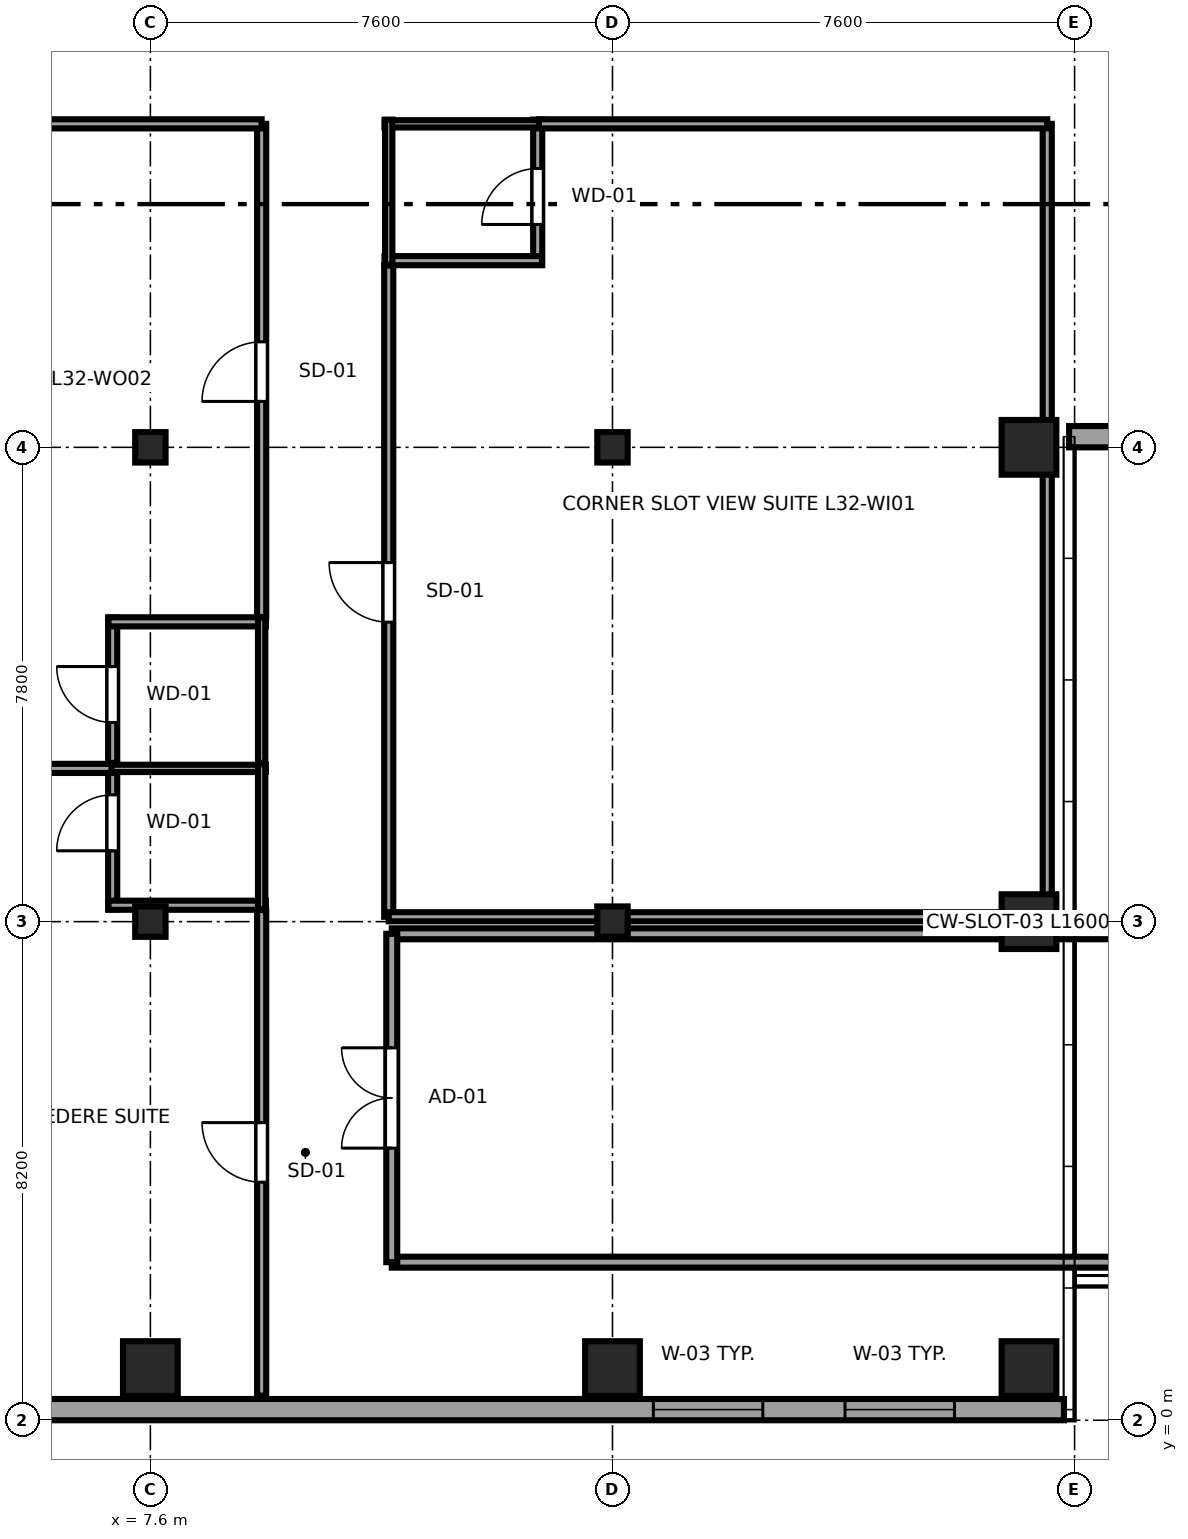
"""IFC4 building model, lengths in metres.
Left out: names, types, materials, properties, quantities, classifications, styles, units other than length and angle.
Written with IfcOpenShell. Run it as: python <this file> out.ifc"""

import sys

from ifc_helpers import new_model, si_unit, direction, frame, frame_2d, origin, origin_2d, place, context, subcontext, project, spatial, rectangle, i_section, extrude, source, transform, mapped, element, fill, save


model = new_model("IFC4")
c1 = context("Model", 3, precision=1e-05, world=origin(), true_north=direction((0.0, 1.0)))
c2 = subcontext(c1, "Body", "Model", "MODEL_VIEW")
j1 = project(units=[si_unit("LENGTHUNIT", "METRE"), si_unit("PLANEANGLEUNIT", "RADIAN")], contexts=[c1])
p1 = place(None, origin())
s1 = spatial("IfcSite", under=j1, at=p1, CompositionType="ELEMENT")
p2 = place(p1, origin())
s2 = spatial("IfcBuilding", under=s1, at=p2, CompositionType="ELEMENT")
p3 = place(p2, frame((0.0, 0.0, 125.75)))
s3 = spatial("IfcBuildingStorey", under=s2, at=p3, CompositionType="ELEMENT", Elevation=125.75)
m1 = source(origin(), c2, "Body", "SweptSolid", [
    extrude(rectangle(XDim=0.9, YDim=0.9, at=origin_2d()), origin(), (0.0, 0.0, 1.0), 3.55),
])
p4 = place(p3, frame((7.6, 0.85, 0.0), z_axis=(0.0, 0.0, 1.0), x_axis=(1.0, 0.0, 0.0)))
e1 = element("IfcColumn", 1, at=p4, inside=s3, PredefinedType="COLUMN", context=c2, shape_type="MappedRepresentation", body=[
    mapped(m1, transform((0.0, 0.0, 0.0), x_axis=(1.0, 0.0, 0.0), y_axis=(0.0, 1.0, 0.0), z_axis=(0.0, 0.0, 1.0), scale=1.0)),
])
m2 = source(origin(), c2, "Body", "SweptSolid", [
    extrude(i_section(OverallWidth=0.5, OverallDepth=0.5, WebThickness=0.022, FlangeThickness=0.034, at=origin_2d()), origin(), (0.0, 0.0, 1.0), 3.55),
])
for number, where, z_axis, x_axis in (
    (2, (7.6, 8.2, 0.0), (0.0, 0.0, 1.0), (1.0, 0.0, 0.0)),
    (3, (7.6, 16.0, 0.0), (0.0, 0.0, 1.0), (1.0, 0.0, 0.0)),
):
    element("IfcColumn", number, at=place(p3, frame(where, z_axis=z_axis, x_axis=x_axis)), inside=s3, PredefinedType="COLUMN", context=c2, shape_type="MappedRepresentation", body=[
        mapped(m2, transform((0.0, 0.0, 0.0), x_axis=(1.0, 0.0, 0.0), y_axis=(0.0, 1.0, 0.0), z_axis=(0.0, 0.0, 1.0), scale=1.0)),
    ])
p5 = place(p3, frame((15.2, 0.85, 0.0), z_axis=(0.0, 0.0, 1.0), x_axis=(1.0, 0.0, 0.0)))
e4 = element("IfcColumn", 4, at=p5, inside=s3, PredefinedType="COLUMN", context=c2, shape_type="MappedRepresentation", body=[
    mapped(m1, transform((0.0, 0.0, 0.0), x_axis=(1.0, 0.0, 0.0), y_axis=(0.0, 1.0, 0.0), z_axis=(0.0, 0.0, 1.0), scale=1.0)),
])
for number, where, z_axis, x_axis in (
    (5, (15.2, 8.2, 0.0), (0.0, 0.0, 1.0), (1.0, 0.0, 0.0)),
    (6, (15.2, 16.0, 0.0), (0.0, 0.0, 1.0), (1.0, 0.0, 0.0)),
):
    element("IfcColumn", number, at=place(p3, frame(where, z_axis=z_axis, x_axis=x_axis)), inside=s3, PredefinedType="COLUMN", context=c2, shape_type="MappedRepresentation", body=[
        mapped(m2, transform((0.0, 0.0, 0.0), x_axis=(1.0, 0.0, 0.0), y_axis=(0.0, 1.0, 0.0), z_axis=(0.0, 0.0, 1.0), scale=1.0)),
    ])
for number, where, z_axis, x_axis in (
    (7, (22.05, 0.85, 0.0), (0.0, 0.0, 1.0), (1.0, 0.0, 0.0)),
    (8, (22.05, 8.2, 0.0), (0.0, 0.0, 1.0), (1.0, 0.0, 0.0)),
    (9, (22.05, 16.0, 0.0), (0.0, 0.0, 1.0), (1.0, 0.0, 0.0)),
):
    element("IfcColumn", number, at=place(p3, frame(where, z_axis=z_axis, x_axis=x_axis)), inside=s3, PredefinedType="COLUMN", context=c2, shape_type="MappedRepresentation", body=[
        mapped(m1, transform((0.0, 0.0, 0.0), x_axis=(1.0, 0.0, 0.0), y_axis=(0.0, 1.0, 0.0), z_axis=(0.0, 0.0, 1.0), scale=1.0)),
    ])
p6 = place(p3, frame((4.617, 0.175, 0.0), z_axis=(0.0, 0.0, 1.0), x_axis=(1.0, 0.0, 0.0)))
e10 = element("IfcWall", 10, at=p6, inside=s3, PredefinedType="SOLIDWALL", context=c2, shape_type="SweptSolid", body=[
    extrude(rectangle(XDim=18.008, YDim=0.35, at=frame_2d((9.004, 0.0))), origin(), (0.0, 0.0, 1.0), 3.37),
])
p7 = place(p6, frame((11.255, 0.0, 0.68)))
e11 = element("IfcOpeningElement", 11, at=p7, cuts=e10, PredefinedType="OPENING", context=c2, shape_type="SweptSolid", body=[
    extrude(rectangle(XDim=1.8, YDim=1.85, at=frame_2d((0.9, 0.925))), frame((0.0, 0.185, 0.0), z_axis=(0.0, -1.0, 0.0), x_axis=(1.0, 0.0, 0.0)), (0.0, 0.0, 1.0), 0.37),
])
p8 = place(p6, frame((14.407, 0.0, 0.68)))
e12 = element("IfcOpeningElement", 12, at=p8, cuts=e10, PredefinedType="OPENING", context=c2, shape_type="SweptSolid", body=[
    extrude(rectangle(XDim=1.8, YDim=1.85, at=frame_2d((0.9, 0.925))), frame((0.0, 0.185, 0.0), z_axis=(0.0, -1.0, 0.0), x_axis=(1.0, 0.0, 0.0)), (0.0, 0.0, 1.0), 0.37),
])
p9 = place(p3, frame((22.71, 16.175, 0.0), z_axis=(0.0, 0.0, 1.0), x_axis=(1.0, 0.0, 0.0)))
e13 = element("IfcWall", 13, at=p9, inside=s3, PredefinedType="SOLIDWALL", context=c2, shape_type="SweptSolid", body=[
    extrude(rectangle(XDim=11.58, YDim=0.35, at=frame_2d((5.79, 0.0))), origin(), (0.0, 0.0, 1.0), 2.748),
])
p10 = place(p9, frame((2.295, 0.0, 0.68)))
e14 = element("IfcOpeningElement", 14, at=p10, cuts=e13, PredefinedType="OPENING", context=c2, shape_type="SweptSolid", body=[
    extrude(rectangle(XDim=1.8, YDim=1.85, at=frame_2d((0.9, 0.925))), frame((0.0, 0.185, 0.0), z_axis=(0.0, -1.0, 0.0), x_axis=(1.0, 0.0, 0.0)), (0.0, 0.0, 1.0), 0.37),
])
p11 = place(p9, frame((7.485, 0.0, 0.68)))
e15 = element("IfcOpeningElement", 15, at=p11, cuts=e13, PredefinedType="OPENING", context=c2, shape_type="SweptSolid", body=[
    extrude(rectangle(XDim=1.8, YDim=1.85, at=frame_2d((0.9, 0.925))), frame((0.0, 0.185, 0.0), z_axis=(0.0, -1.0, 0.0), x_axis=(1.0, 0.0, 0.0)), (0.0, 0.0, 1.0), 0.37),
])
p12 = place(p3, frame((6.98, 8.4, 0.0), z_axis=(0.0, 0.0, 1.0), x_axis=(0.0, 1.0, 0.0)))
e16 = element("IfcWall", 16, at=p12, inside=s3, PredefinedType="PARTITIONING", context=c2, shape_type="SweptSolid", body=[
    extrude(rectangle(XDim=2.39, YDim=0.15, at=frame_2d((1.195, 0.0))), origin(), (0.0, 0.0, 1.0), 3.37),
])
p13 = place(p12, frame((0.965, 0.0, 0.0)))
e17 = element("IfcOpeningElement", 17, at=p13, cuts=e16, PredefinedType="OPENING", context=c2, shape_type="SweptSolid", body=[
    extrude(rectangle(XDim=0.92, YDim=2.01, at=frame_2d((0.46, 1.005))), frame((0.0, 0.085, 0.0), z_axis=(0.0, -1.0, 0.0), x_axis=(1.0, 0.0, 0.0)), (0.0, 0.0, 1.0), 0.17),
])
p14 = place(p3, frame((6.91, 8.47, 0.0), z_axis=(0.0, 0.0, 1.0), x_axis=(1.0, 0.0, 0.0)))
e18 = element("IfcWall", 18, at=p14, inside=s3, PredefinedType="PARTITIONING", context=c2, shape_type="SweptSolid", body=[
    extrude(rectangle(XDim=2.59, YDim=0.15, at=frame_2d((1.295, 0.0))), origin(), (0.0, 0.0, 1.0), 3.37),
])
p15 = place(p3, frame((6.91, 10.72, 0.0), z_axis=(0.0, 0.0, 1.0), x_axis=(1.0, 0.0, 0.0)))
e19 = element("IfcWall", 19, at=p15, inside=s3, PredefinedType="PLUMBINGWALL", context=c2, shape_type="SweptSolid", body=[
    extrude(rectangle(XDim=2.59, YDim=0.12, at=frame_2d((1.295, 0.0))), origin(), (0.0, 0.0, 1.0), 3.37),
])
p16 = place(p3, frame((9.43, 8.4, 0.0), z_axis=(0.0, 0.0, 1.0), x_axis=(0.0, 1.0, 0.0)))
e20 = element("IfcWall", 20, at=p16, inside=s3, PredefinedType="PLUMBINGWALL", context=c2, shape_type="SweptSolid", body=[
    extrude(rectangle(XDim=2.39, YDim=0.12, at=frame_2d((1.195, 0.0))), origin(), (0.0, 0.0, 1.0), 3.37),
])
p17 = place(p3, frame((6.98, 10.81, 0.0), z_axis=(0.0, 0.0, 1.0), x_axis=(0.0, 1.0, 0.0)))
e21 = element("IfcWall", 21, at=p17, inside=s3, PredefinedType="PARTITIONING", context=c2, shape_type="SweptSolid", body=[
    extrude(rectangle(XDim=2.39, YDim=0.15, at=frame_2d((1.195, 0.0))), origin(), (0.0, 0.0, 1.0), 3.37),
])
p18 = place(p17, frame((0.665, 0.0, 0.0)))
e22 = element("IfcOpeningElement", 22, at=p18, cuts=e21, PredefinedType="OPENING", context=c2, shape_type="SweptSolid", body=[
    extrude(rectangle(XDim=0.92, YDim=2.01, at=frame_2d((0.46, 1.005))), frame((0.0, 0.085, 0.0), z_axis=(0.0, -1.0, 0.0), x_axis=(1.0, 0.0, 0.0)), (0.0, 0.0, 1.0), 0.17),
])
p19 = place(p3, frame((6.91, 13.13, 0.0), z_axis=(0.0, 0.0, 1.0), x_axis=(1.0, 0.0, 0.0)))
e23 = element("IfcWall", 23, at=p19, inside=s3, PredefinedType="PARTITIONING", context=c2, shape_type="SweptSolid", body=[
    extrude(rectangle(XDim=2.59, YDim=0.15, at=frame_2d((1.295, 0.0))), origin(), (0.0, 0.0, 1.0), 3.37),
])
p20 = place(p3, frame((9.43, 10.81, 0.0), z_axis=(0.0, 0.0, 1.0), x_axis=(0.0, 1.0, 0.0)))
e24 = element("IfcWall", 24, at=p20, inside=s3, PredefinedType="PLUMBINGWALL", context=c2, shape_type="SweptSolid", body=[
    extrude(rectangle(XDim=2.39, YDim=0.12, at=frame_2d((1.195, 0.0))), origin(), (0.0, 0.0, 1.0), 3.37),
])
p21 = place(p3, frame((13.97, 19.0, 0.0), z_axis=(0.0, 0.0, 1.0), x_axis=(0.0, 1.0, 0.0)))
e25 = element("IfcWall", 25, at=p21, inside=s3, PredefinedType="PARTITIONING", context=c2, shape_type="SweptSolid", body=[
    extrude(rectangle(XDim=2.39, YDim=0.15, at=frame_2d((1.195, 0.0))), origin(), (0.0, 0.0, 1.0), 3.37),
])
p22 = place(p21, frame((0.665, 0.0, 0.0)))
e26 = element("IfcOpeningElement", 26, at=p22, cuts=e25, PredefinedType="OPENING", context=c2, shape_type="SweptSolid", body=[
    extrude(rectangle(XDim=0.92, YDim=2.01, at=frame_2d((0.46, 1.005))), frame((0.0, 0.085, 0.0), z_axis=(0.0, -1.0, 0.0), x_axis=(1.0, 0.0, 0.0)), (0.0, 0.0, 1.0), 0.17),
])
p23 = place(p3, frame((11.45, 19.07, 0.0), z_axis=(0.0, 0.0, 1.0), x_axis=(1.0, 0.0, 0.0)))
e27 = element("IfcWall", 27, at=p23, inside=s3, PredefinedType="PARTITIONING", context=c2, shape_type="SweptSolid", body=[
    extrude(rectangle(XDim=2.59, YDim=0.15, at=frame_2d((1.295, 0.0))), origin(), (0.0, 0.0, 1.0), 3.37),
])
p24 = place(p3, frame((11.45, 21.32, 0.0), z_axis=(0.0, 0.0, 1.0), x_axis=(1.0, 0.0, 0.0)))
e28 = element("IfcWall", 28, at=p24, inside=s3, PredefinedType="PLUMBINGWALL", context=c2, shape_type="SweptSolid", body=[
    extrude(rectangle(XDim=2.59, YDim=0.12, at=frame_2d((1.295, 0.0))), origin(), (0.0, 0.0, 1.0), 3.37),
])
p25 = place(p3, frame((11.52, 19.0, 0.0), z_axis=(0.0, 0.0, 1.0), x_axis=(0.0, 1.0, 0.0)))
e29 = element("IfcWall", 29, at=p25, inside=s3, PredefinedType="PLUMBINGWALL", context=c2, shape_type="SweptSolid", body=[
    extrude(rectangle(XDim=2.39, YDim=0.12, at=frame_2d((1.195, 0.0))), origin(), (0.0, 0.0, 1.0), 2.954),
])
p26 = place(p3, frame((9.43, 0.405, 0.0), z_axis=(0.0, 0.0, 1.0), x_axis=(0.0, 1.0, 0.0)))
e30 = element("IfcWall", 30, at=p26, inside=s3, PredefinedType="PARTITIONING", context=c2, shape_type="SweptSolid", body=[
    extrude(rectangle(XDim=7.985, YDim=0.15, at=frame_2d((3.992, 0.0))), origin(), (0.0, 0.0, 1.0), 3.37),
])
p27 = place(p26, frame((3.51, 0.0, 0.0)))
e31 = element("IfcOpeningElement", 31, at=p27, cuts=e30, PredefinedType="OPENING", context=c2, shape_type="SweptSolid", body=[
    extrude(rectangle(XDim=0.98, YDim=2.12, at=frame_2d((0.49, 1.06))), frame((0.0, 0.085, 0.0), z_axis=(0.0, -1.0, 0.0), x_axis=(1.0, 0.0, 0.0)), (0.0, 0.0, 1.0), 0.17),
])
p28 = place(p3, frame((0.405, 10.72, 0.0), z_axis=(0.0, 0.0, 1.0), x_axis=(1.0, 0.0, 0.0)))
e32 = element("IfcWall", 32, at=p28, inside=s3, PredefinedType="PARTITIONING", context=c2, shape_type="SweptSolid", body=[
    extrude(rectangle(XDim=6.555, YDim=0.15, at=frame_2d((3.277, 0.0))), origin(), (0.0, 0.0, 1.0), 3.37),
])
p29 = place(p3, frame((9.43, 13.21, 0.0), z_axis=(0.0, 0.0, 1.0), x_axis=(0.0, 1.0, 0.0)))
e33 = element("IfcWall", 33, at=p29, inside=s3, PredefinedType="PARTITIONING", context=c2, shape_type="SweptSolid", body=[
    extrude(rectangle(XDim=8.11, YDim=0.15, at=frame_2d((4.055, 0.0))), origin(), (0.0, 0.0, 1.0), 3.37),
])
p30 = place(p29, frame((3.545, 0.0, 0.0)))
e34 = element("IfcOpeningElement", 34, at=p30, cuts=e33, PredefinedType="OPENING", context=c2, shape_type="SweptSolid", body=[
    extrude(rectangle(XDim=0.98, YDim=2.12, at=frame_2d((0.49, 1.06))), frame((0.0, 0.085, 0.0), z_axis=(0.0, -1.0, 0.0), x_axis=(1.0, 0.0, 0.0)), (0.0, 0.0, 1.0), 0.17),
])
p31 = place(p3, frame((0.405, 21.32, 0.0), z_axis=(0.0, 0.0, 1.0), x_axis=(1.0, 0.0, 0.0)))
e35 = element("IfcWall", 35, at=p31, inside=s3, PredefinedType="PARTITIONING", context=c2, shape_type="SweptSolid", body=[
    extrude(rectangle(XDim=9.025, YDim=0.15, at=frame_2d((4.512, 0.0))), origin(), (0.0, 0.0, 1.0), 3.37),
])
p32 = place(p3, frame((11.52, 8.28, 0.0), z_axis=(0.0, 0.0, 1.0), x_axis=(0.0, 1.0, 0.0)))
e36 = element("IfcWall", 36, at=p32, inside=s3, PredefinedType="PARTITIONING", context=c2, shape_type="SweptSolid", body=[
    extrude(rectangle(XDim=10.71, YDim=0.15, at=frame_2d((5.355, 0.0))), origin(), (0.0, 0.0, 1.0), 2.954),
])
p33 = place(p32, frame((4.845, 0.0, 0.0)))
e37 = element("IfcOpeningElement", 37, at=p33, cuts=e36, PredefinedType="OPENING", context=c2, shape_type="SweptSolid", body=[
    extrude(rectangle(XDim=0.98, YDim=2.12, at=frame_2d((0.49, 1.06))), frame((0.0, 0.085, 0.0), z_axis=(0.0, -1.0, 0.0), x_axis=(1.0, 0.0, 0.0)), (0.0, 0.0, 1.0), 0.17),
])
p34 = place(p3, frame((11.52, 8.28, 0.0), z_axis=(0.0, 0.0, 1.0), x_axis=(1.0, 0.0, 0.0)))
e38 = element("IfcWall", 38, at=p34, inside=s3, PredefinedType="PARTITIONING", context=c2, shape_type="SweptSolid", body=[
    extrude(rectangle(XDim=10.83, YDim=0.15, at=frame_2d((5.415, 0.0))), origin(), (0.0, 0.0, 1.0), 2.748),
])
p35 = place(p3, frame((22.35, 8.28, 0.0), z_axis=(0.0, 0.0, 1.0), x_axis=(0.0, 1.0, 0.0)))
e39 = element("IfcWall", 39, at=p35, inside=s3, PredefinedType="PARTITIONING", context=c2, shape_type="SweptSolid", body=[
    extrude(rectangle(XDim=13.04, YDim=0.15, at=frame_2d((6.52, 0.0))), origin(), (0.0, 0.0, 1.0), 3.37),
])
p36 = place(p3, frame((13.99, 21.32, 0.0), z_axis=(0.0, 0.0, 1.0), x_axis=(1.0, 0.0, 0.0)))
e40 = element("IfcWall", 40, at=p36, inside=s3, PredefinedType="PARTITIONING", context=c2, shape_type="SweptSolid", body=[
    extrude(rectangle(XDim=8.36, YDim=0.15, at=frame_2d((4.18, 0.0))), origin(), (0.0, 0.0, 1.0), 3.37),
])
for number, where, z_axis, x_axis in (
    (41, (11.57, 2.6, 0.0), (0.0, 0.0, 1.0), (1.0, 0.0, 0.0)),
    (42, (11.57, 8.0, 0.0), (0.0, 0.0, 1.0), (1.0, 0.0, 0.0)),
):
    element("IfcWall", number, at=place(p3, frame(where, z_axis=z_axis, x_axis=x_axis)), inside=s3, PredefinedType="PARTITIONING", context=c2, shape_type="SweptSolid", body=[
        extrude(rectangle(XDim=35.11, YDim=0.18, at=frame_2d((17.555, 0.0))), origin(), (0.0, 0.0, 1.0), 3.37),
    ])
p37 = place(p3, frame((11.57, 2.6, 0.0), z_axis=(0.0, 0.0, 1.0), x_axis=(0.0, 1.0, 0.0)))
e43 = element("IfcWall", 43, at=p37, inside=s3, PredefinedType="PARTITIONING", context=c2, shape_type="SweptSolid", body=[
    extrude(rectangle(XDim=5.4, YDim=0.18, at=frame_2d((2.7, 0.0))), origin(), (0.0, 0.0, 1.0), 3.37),
])
p38 = place(p37, frame((1.875, 0.0, 0.0)))
e44 = element("IfcOpeningElement", 44, at=p38, cuts=e43, PredefinedType="OPENING", context=c2, shape_type="SweptSolid", body=[
    extrude(rectangle(XDim=1.65, YDim=2.15, at=frame_2d((0.825, 1.075))), frame((0.0, 0.1, 0.0), z_axis=(0.0, -1.0, 0.0), x_axis=(1.0, 0.0, 0.0)), (0.0, 0.0, 1.0), 0.2),
])
m3 = source(origin(), c2, "Body", "SweptSolid", [
    extrude(rectangle(XDim=1.8, YDim=1.85, at=frame_2d((0.9, 0.925))), frame((0.0, 0.09, 0.0), z_axis=(0.0, -1.0, 0.0), x_axis=(1.0, 0.0, 0.0)), (0.0, 0.0, 1.0), 0.06),
])
p39 = place(p7, origin())
e45 = element("IfcWindow", 45, at=p39, inside=s3, PartitioningType="TRIPLE_PANEL_HORIZONTAL", PredefinedType="WINDOW", context=c2, shape_type="MappedRepresentation", body=[
    mapped(m3, transform((0.0, 0.0, 0.0), x_axis=(1.0, 0.0, 0.0), y_axis=(0.0, 1.0, 0.0), z_axis=(0.0, 0.0, 1.0), scale=1.0)),
])
fill(e11, e45)
p40 = place(p8, origin())
e46 = element("IfcWindow", 46, at=p40, inside=s3, PartitioningType="TRIPLE_PANEL_HORIZONTAL", PredefinedType="WINDOW", context=c2, shape_type="MappedRepresentation", body=[
    mapped(m3, transform((0.0, 0.0, 0.0), x_axis=(1.0, 0.0, 0.0), y_axis=(0.0, 1.0, 0.0), z_axis=(0.0, 0.0, 1.0), scale=1.0)),
])
fill(e12, e46)
m4 = source(origin(), c2, "Body", "SweptSolid", [
    extrude(rectangle(XDim=0.92, YDim=2.01, at=frame_2d((0.46, 1.005))), frame((0.0, 0.025, 0.0), z_axis=(0.0, -1.0, 0.0), x_axis=(1.0, 0.0, 0.0)), (0.0, 0.0, 1.0), 0.05),
])
p41 = place(p13, origin())
e47 = element("IfcDoor", 47, at=p41, inside=s3, OperationType="SINGLE_SWING_LEFT", PredefinedType="DOOR", context=c2, shape_type="MappedRepresentation", body=[
    mapped(m4, transform((0.0, 0.0, 0.0), x_axis=(1.0, 0.0, 0.0), y_axis=(0.0, 1.0, 0.0), z_axis=(0.0, 0.0, 1.0), scale=1.0)),
])
fill(e17, e47)
p42 = place(p18, origin())
e48 = element("IfcDoor", 48, at=p42, inside=s3, OperationType="SINGLE_SWING_RIGHT", PredefinedType="DOOR", context=c2, shape_type="MappedRepresentation", body=[
    mapped(m4, transform((0.0, 0.0, 0.0), x_axis=(1.0, 0.0, 0.0), y_axis=(0.0, 1.0, 0.0), z_axis=(0.0, 0.0, 1.0), scale=1.0)),
])
fill(e22, e48)
p43 = place(p22, origin())
e49 = element("IfcDoor", 49, at=p43, inside=s3, OperationType="SINGLE_SWING_LEFT", PredefinedType="DOOR", context=c2, shape_type="MappedRepresentation", body=[
    mapped(m4, transform((0.0, 0.0, 0.0), x_axis=(1.0, 0.0, 0.0), y_axis=(0.0, 1.0, 0.0), z_axis=(0.0, 0.0, 1.0), scale=1.0)),
])
fill(e26, e49)
m5 = source(origin(), c2, "Body", "SweptSolid", [
    extrude(rectangle(XDim=0.98, YDim=2.12, at=frame_2d((0.49, 1.06))), frame((0.0, 0.025, 0.0), z_axis=(0.0, -1.0, 0.0), x_axis=(1.0, 0.0, 0.0)), (0.0, 0.0, 1.0), 0.05),
])
p44 = place(p27, origin())
e50 = element("IfcDoor", 50, at=p44, inside=s3, OperationType="SINGLE_SWING_RIGHT", PredefinedType="DOOR", context=c2, shape_type="MappedRepresentation", body=[
    mapped(m5, transform((0.0, 0.0, 0.0), x_axis=(1.0, 0.0, 0.0), y_axis=(0.0, 1.0, 0.0), z_axis=(0.0, 0.0, 1.0), scale=1.0)),
])
fill(e31, e50)
p45 = place(p30, origin())
e51 = element("IfcDoor", 51, at=p45, inside=s3, OperationType="SINGLE_SWING_LEFT", PredefinedType="DOOR", context=c2, shape_type="MappedRepresentation", body=[
    mapped(m5, transform((0.0, 0.0, 0.0), x_axis=(1.0, 0.0, 0.0), y_axis=(0.0, 1.0, 0.0), z_axis=(0.0, 0.0, 1.0), scale=1.0)),
])
fill(e34, e51)
p46 = place(p33, origin())
e52 = element("IfcDoor", 52, at=p46, inside=s3, OperationType="SINGLE_SWING_RIGHT", PredefinedType="DOOR", context=c2, shape_type="MappedRepresentation", body=[
    mapped(m5, transform((0.0, 0.0, 0.0), x_axis=(1.0, 0.0, 0.0), y_axis=(0.0, 1.0, 0.0), z_axis=(0.0, 0.0, 1.0), scale=1.0)),
])
fill(e37, e52)
m6 = source(origin(), c2, "Body", "SweptSolid", [
    extrude(rectangle(XDim=1.65, YDim=2.15, at=frame_2d((0.825, 1.075))), frame((0.0, 0.025, 0.0), z_axis=(0.0, -1.0, 0.0), x_axis=(1.0, 0.0, 0.0)), (0.0, 0.0, 1.0), 0.05),
])
p47 = place(p38, origin())
e53 = element("IfcDoor", 53, at=p47, inside=s3, OperationType="DOUBLE_DOOR_SINGLE_SWING", PredefinedType="DOOR", context=c2, shape_type="MappedRepresentation", body=[
    mapped(m6, transform((0.0, 0.0, 0.0), x_axis=(1.0, 0.0, 0.0), y_axis=(0.0, 1.0, 0.0), z_axis=(0.0, 0.0, 1.0), scale=1.0)),
])
fill(e44, e53)
save(model, sys.argv[1])
